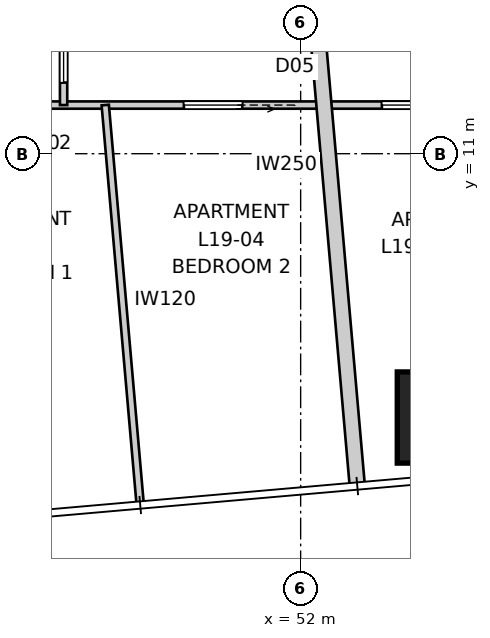
"""IFC4 building model, lengths in metres.
Left out: names, types, materials, properties, quantities, classifications, styles, units other than length and angle.
Written with IfcOpenShell. Run it as: python <this file> out.ifc"""

import sys

from ifc_helpers import new_model, si_unit, direction, frame, frame_2d, origin, origin_2d, place, context, subcontext, project, spatial, rectangle, extrude, element, fill, save


model = new_model("IFC4")
c1 = context("Model", 3, precision=1e-05, world=origin(), true_north=direction((0.0, 1.0)))
c2 = subcontext(c1, "Body", "Model", "MODEL_VIEW")
j1 = project(units=[si_unit("LENGTHUNIT", "METRE"), si_unit("PLANEANGLEUNIT", "RADIAN")], contexts=[c1])
p1 = place(None, origin())
s1 = spatial("IfcSite", under=j1, at=p1, CompositionType="ELEMENT")
p2 = place(p1, origin())
s2 = spatial("IfcBuilding", under=s1, at=p2, CompositionType="ELEMENT")
p3 = place(p2, frame((0.0, 0.0, 71.0)))
s3 = spatial("IfcBuildingStorey", under=s2, at=p3, CompositionType="ELEMENT", Elevation=71.0)
p4 = place(p3, frame((54.339, 6.661, 0.0), z_axis=(0.0, 0.0, 1.0), x_axis=(1.0, 0.0, 0.0)))
e1 = element("IfcColumn", 1, at=p4, inside=s3, PredefinedType="COLUMN", context=c2, shape_type="SweptSolid", body=[
    extrude(rectangle(XDim=1.5, YDim=1.5, at=origin_2d()), origin(), (0.0, 0.0, 1.0), 3.2),
])
p5 = place(p3, frame((52.932, 5.534, 0.0), z_axis=(0.0, 0.0, 1.0), x_axis=(-0.08716441141, 0.996193939644, 0.0)))
e2 = element("IfcWall", 2, at=p5, inside=s3, PredefinedType="PARTITIONING", context=c2, shape_type="SweptSolid", body=[
    extrude(rectangle(XDim=10.736, YDim=0.25, at=frame_2d((5.368, 0.0))), origin(), (0.0, 0.0, 1.0), 3.2),
])
p6 = place(p3, frame((58.2, 11.8, 0.0), z_axis=(0.0, 0.0, 1.0), x_axis=(-1.0, 0.0, 0.0)))
e3 = element("IfcWall", 3, at=p6, inside=s3, PredefinedType="PARTITIONING", context=c2, shape_type="SweptSolid", body=[
    extrude(rectangle(XDim=36.4, YDim=0.12, at=frame_2d((18.2, 0.0))), origin(), (0.0, 0.0, 1.0), 3.2),
])
p7 = place(p6, frame((11.12, 0.0, 0.0)))
e4 = element("IfcOpeningElement", 4, at=p7, cuts=e3, PredefinedType="OPENING", context=c2, shape_type="SweptSolid", body=[
    extrude(rectangle(XDim=0.92, YDim=2.34, at=frame_2d((0.46, 1.17))), frame((0.0, 0.07, 0.0), z_axis=(0.0, -1.0, 0.0), x_axis=(1.0, 0.0, 0.0)), (0.0, 0.0, 1.0), 0.14),
])
p8 = place(p6, frame((17.971, 0.0, 0.0)))
e5 = element("IfcOpeningElement", 5, at=p8, cuts=e3, PredefinedType="OPENING", context=c2, shape_type="SweptSolid", body=[
    extrude(rectangle(XDim=0.92, YDim=2.34, at=frame_2d((0.46, 1.17))), frame((0.0, 0.07, 0.0), z_axis=(0.0, -1.0, 0.0), x_axis=(1.0, 0.0, 0.0)), (0.0, 0.0, 1.0), 0.14),
])
p9 = place(p6, frame((28.877, 0.0, 0.0)))
e6 = element("IfcOpeningElement", 6, at=p9, cuts=e3, PredefinedType="OPENING", context=c2, shape_type="SweptSolid", body=[
    extrude(rectangle(XDim=0.92, YDim=2.34, at=frame_2d((0.46, 1.17))), frame((0.0, 0.07, 0.0), z_axis=(0.0, -1.0, 0.0), x_axis=(1.0, 0.0, 0.0)), (0.0, 0.0, 1.0), 0.14),
])
p10 = place(p6, frame((7.16, 0.0, 0.0)))
e7 = element("IfcOpeningElement", 7, at=p10, cuts=e3, PredefinedType="OPENING", context=c2, shape_type="SweptSolid", body=[
    extrude(rectangle(XDim=0.96, YDim=2.1, at=frame_2d((0.48, 1.05))), frame((0.0, 0.07, 0.0), z_axis=(0.0, -1.0, 0.0), x_axis=(1.0, 0.0, 0.0)), (0.0, 0.0, 1.0), 0.14),
])
p11 = place(p6, frame((15.181, 0.0, 0.0)))
e8 = element("IfcOpeningElement", 8, at=p11, cuts=e3, PredefinedType="OPENING", context=c2, shape_type="SweptSolid", body=[
    extrude(rectangle(XDim=0.96, YDim=2.1, at=frame_2d((0.48, 1.05))), frame((0.0, 0.07, 0.0), z_axis=(0.0, -1.0, 0.0), x_axis=(1.0, 0.0, 0.0)), (0.0, 0.0, 1.0), 0.14),
])
p12 = place(p6, frame((32.668, 0.0, 0.0)))
e9 = element("IfcOpeningElement", 9, at=p12, cuts=e3, PredefinedType="OPENING", context=c2, shape_type="SweptSolid", body=[
    extrude(rectangle(XDim=0.92, YDim=2.0, at=frame_2d((0.46, 1.0))), frame((0.0, 0.07, 0.0), z_axis=(0.0, -1.0, 0.0), x_axis=(1.0, 0.0, 0.0)), (0.0, 0.0, 1.0), 0.14),
])
p13 = place(p6, frame((35.011, 0.0, 0.0)))
e10 = element("IfcOpeningElement", 10, at=p13, cuts=e3, PredefinedType="OPENING", context=c2, shape_type="SweptSolid", body=[
    extrude(rectangle(XDim=0.92, YDim=2.34, at=frame_2d((0.46, 1.17))), frame((0.0, 0.07, 0.0), z_axis=(0.0, -1.0, 0.0), x_axis=(1.0, 0.0, 0.0)), (0.0, 0.0, 1.0), 0.14),
])
p14 = place(p6, frame((0.675, 0.0, 0.0)))
e11 = element("IfcOpeningElement", 11, at=p14, cuts=e3, PredefinedType="OPENING", context=c2, shape_type="SweptSolid", body=[
    extrude(rectangle(XDim=0.92, YDim=2.34, at=frame_2d((0.46, 1.17))), frame((0.0, 0.07, 0.0), z_axis=(0.0, -1.0, 0.0), x_axis=(1.0, 0.0, 0.0)), (0.0, 0.0, 1.0), 0.14),
])
p15 = place(p6, frame((25.11, 0.0, 0.0)))
e12 = element("IfcOpeningElement", 12, at=p15, cuts=e3, PredefinedType="OPENING", context=c2, shape_type="SweptSolid", body=[
    extrude(rectangle(XDim=0.96, YDim=2.1, at=frame_2d((0.48, 1.05))), frame((0.0, 0.07, 0.0), z_axis=(0.0, -1.0, 0.0), x_axis=(1.0, 0.0, 0.0)), (0.0, 0.0, 1.0), 0.14),
])
p16 = place(p6, frame((3.904, 0.0, 0.0)))
e13 = element("IfcOpeningElement", 13, at=p16, cuts=e3, PredefinedType="OPENING", context=c2, shape_type="SweptSolid", body=[
    extrude(rectangle(XDim=0.96, YDim=2.1, at=frame_2d((0.48, 1.05))), frame((0.0, 0.07, 0.0), z_axis=(0.0, -1.0, 0.0), x_axis=(1.0, 0.0, 0.0)), (0.0, 0.0, 1.0), 0.14),
])
p17 = place(p3, frame((48.101, 16.2, 0.0), z_axis=(0.0, 0.0, 1.0), x_axis=(0.0, -1.0, 0.0)))
e14 = element("IfcWall", 14, at=p17, inside=s3, PredefinedType="PARTITIONING", context=c2, shape_type="SweptSolid", body=[
    extrude(rectangle(XDim=4.4, YDim=0.12, at=frame_2d((2.2, 0.0))), origin(), (0.0, 0.0, 1.0), 3.2),
])
p18 = place(p17, frame((3.07, 0.0, 0.0)))
e15 = element("IfcOpeningElement", 15, at=p18, cuts=e14, PredefinedType="OPENING", context=c2, shape_type="SweptSolid", body=[
    extrude(rectangle(XDim=0.96, YDim=2.1, at=frame_2d((0.48, 1.05))), frame((0.0, 0.07, 0.0), z_axis=(0.0, -1.0, 0.0), x_axis=(1.0, 0.0, 0.0)), (0.0, 0.0, 1.0), 0.14),
])
p19 = place(p3, frame((48.786, 11.8, 0.0), z_axis=(0.0, 0.0, 1.0), x_axis=(0.087151261897, -0.996195090105, 0.0)))
e16 = element("IfcWall", 16, at=p19, inside=s3, PredefinedType="PARTITIONING", context=c2, shape_type="SweptSolid", body=[
    extrude(rectangle(XDim=6.563, YDim=0.12, at=frame_2d((3.282, 0.0))), origin(), (0.0, 0.0, 1.0), 3.2),
])
p20 = place(p18, origin())
e17 = element("IfcDoor", 17, at=p20, inside=s3, OperationType="SLIDING_TO_LEFT", PredefinedType="DOOR", context=c2, shape_type="SweptSolid", body=[
    extrude(rectangle(XDim=0.96, YDim=2.1, at=frame_2d((0.48, 1.05))), frame((0.0, 0.025, 0.0), z_axis=(0.0, -1.0, 0.0), x_axis=(1.0, 0.0, 0.0)), (0.0, 0.0, 1.0), 0.05),
])
fill(e15, e17)
p21 = place(p10, origin())
e18 = element("IfcDoor", 18, at=p21, inside=s3, OperationType="SLIDING_TO_LEFT", PredefinedType="DOOR", context=c2, shape_type="SweptSolid", body=[
    extrude(rectangle(XDim=0.96, YDim=2.1, at=frame_2d((0.48, 1.05))), frame((0.0, 0.025, 0.0), z_axis=(0.0, -1.0, 0.0), x_axis=(1.0, 0.0, 0.0)), (0.0, 0.0, 1.0), 0.05),
])
fill(e7, e18)
p22 = place(p16, origin())
e19 = element("IfcDoor", 19, at=p22, inside=s3, OperationType="SLIDING_TO_LEFT", PredefinedType="DOOR", context=c2, shape_type="SweptSolid", body=[
    extrude(rectangle(XDim=0.96, YDim=2.1, at=frame_2d((0.48, 1.05))), frame((0.0, 0.025, 0.0), z_axis=(0.0, -1.0, 0.0), x_axis=(1.0, 0.0, 0.0)), (0.0, 0.0, 1.0), 0.05),
])
fill(e13, e19)
save(model, sys.argv[1])
